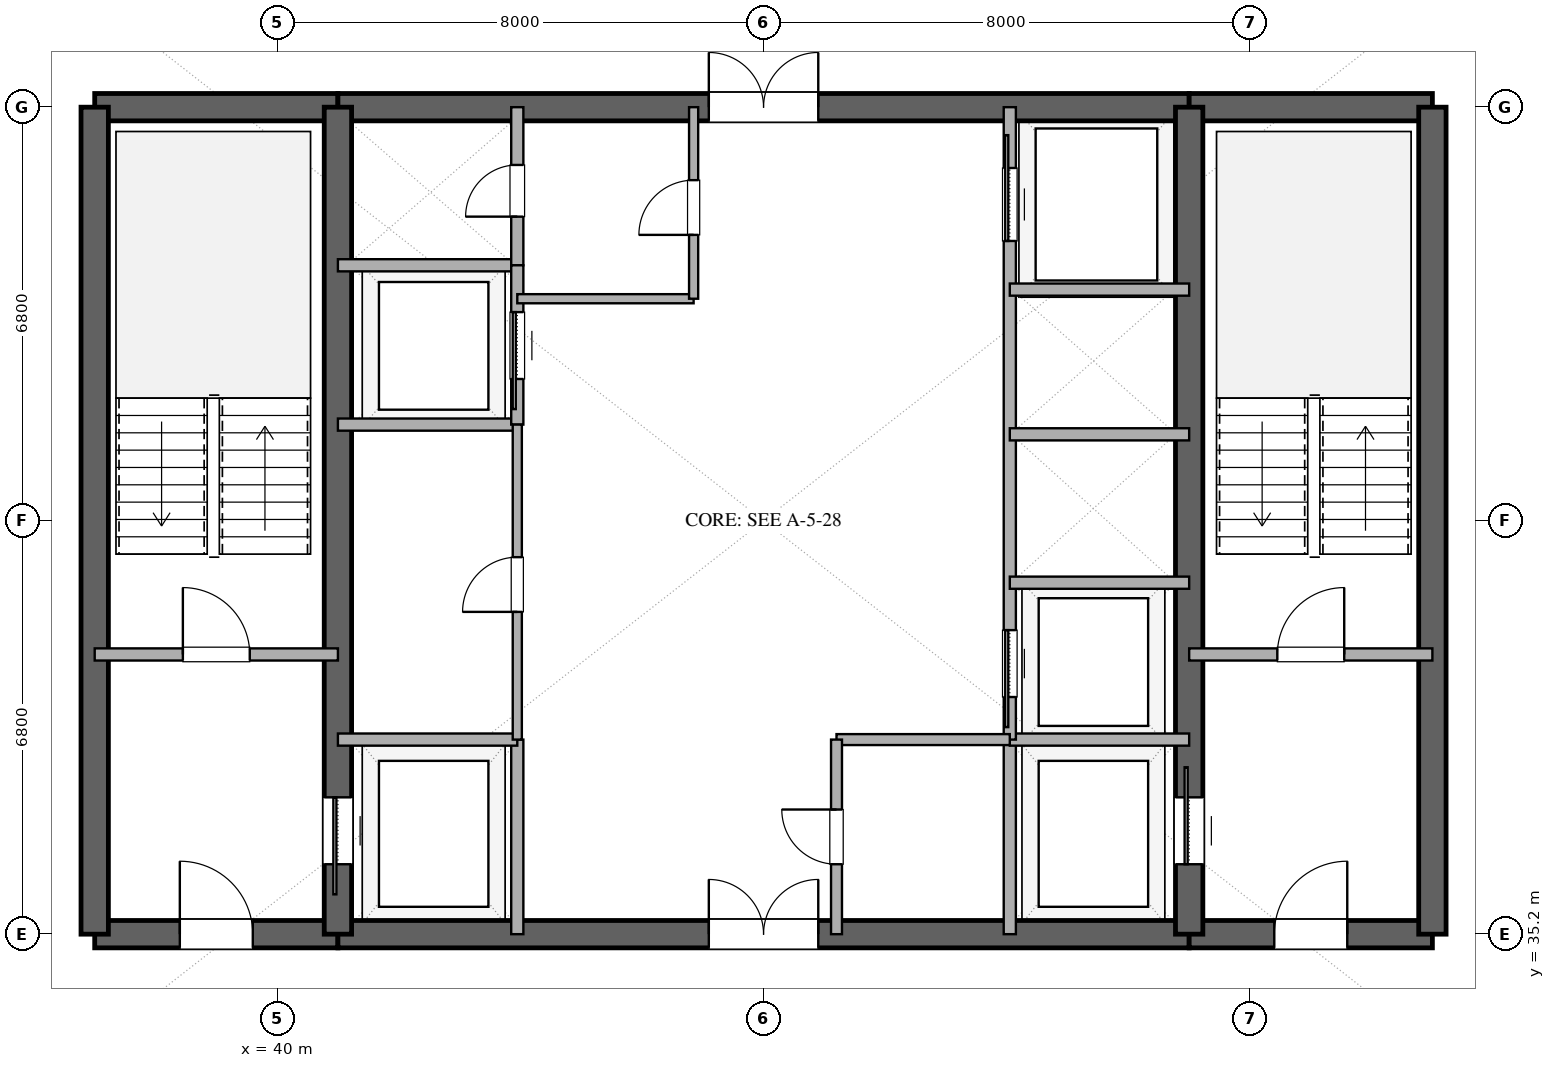
"""IFC4 building model, lengths in metres.
Left out: names, types, materials, properties, quantities, classifications, styles, units other than length and angle.
Written with IfcOpenShell. Run it as: python <this file> out.ifc"""

import sys

from ifc_helpers import new_model, si_unit, direction, frame, frame_2d, origin, place, context, subcontext, project, spatial, rectangle, extrude, element, fill, save


model = new_model("IFC4")
c1 = context("Model", 3, precision=1e-05, world=origin(), true_north=direction((0.0, 1.0)))
c2 = subcontext(c1, "Body", "Model", "MODEL_VIEW")
j1 = project(units=[si_unit("LENGTHUNIT", "METRE"), si_unit("PLANEANGLEUNIT", "RADIAN")], contexts=[c1])
p1 = place(None, origin())
s1 = spatial("IfcSite", under=j1, at=p1, CompositionType="ELEMENT")
p2 = place(p1, origin())
s2 = spatial("IfcBuilding", under=s1, at=p2, CompositionType="ELEMENT")
p3 = place(p2, frame((0.0, 0.0, 183.0)))
s3 = spatial("IfcBuildingStorey", under=s2, at=p3, CompositionType="ELEMENT", Elevation=183.0)
p4 = place(p3, frame((37.0, 35.2, 0.0), z_axis=(0.0, 0.0, 1.0), x_axis=(1.0, 0.0, 0.0)))
e1 = element("IfcWall", 1, at=p4, inside=s3, PredefinedType="SHEAR", context=c2, shape_type="SweptSolid", body=[
    extrude(rectangle(XDim=4.0, YDim=0.45, at=frame_2d((2.0, 0.0))), origin(), (0.0, 0.0, 1.0), 3.38),
])
p5 = place(p4, frame((1.4, 0.0, 0.0)))
e2 = element("IfcOpeningElement", 2, at=p5, cuts=e1, PredefinedType="OPENING", context=c2, shape_type="SweptSolid", body=[
    extrude(rectangle(XDim=1.2, YDim=2.15, at=frame_2d((0.6, 1.075))), frame((0.0, 0.235, 0.0), z_axis=(0.0, -1.0, 0.0), x_axis=(1.0, 0.0, 0.0)), (0.0, 0.0, 1.0), 0.47),
])
p6 = place(p3, frame((41.0, 35.2, 0.0), z_axis=(0.0, 0.0, 1.0), x_axis=(1.0, 0.0, 0.0)))
e3 = element("IfcWall", 3, at=p6, inside=s3, PredefinedType="SHEAR", context=c2, shape_type="SweptSolid", body=[
    extrude(rectangle(XDim=14.0, YDim=0.45, at=frame_2d((7.0, 0.0))), origin(), (0.0, 0.0, 1.0), 3.38),
])
p7 = place(p6, frame((6.1, 0.0, 0.0)))
e4 = element("IfcOpeningElement", 4, at=p7, cuts=e3, PredefinedType="OPENING", context=c2, shape_type="SweptSolid", body=[
    extrude(rectangle(XDim=1.8, YDim=2.25, at=frame_2d((0.9, 1.125))), frame((0.0, 0.235, 0.0), z_axis=(0.0, -1.0, 0.0), x_axis=(1.0, 0.0, 0.0)), (0.0, 0.0, 1.0), 0.47),
])
p8 = place(p3, frame((55.0, 35.2, 0.0), z_axis=(0.0, 0.0, 1.0), x_axis=(1.0, 0.0, 0.0)))
e5 = element("IfcWall", 5, at=p8, inside=s3, PredefinedType="SHEAR", context=c2, shape_type="SweptSolid", body=[
    extrude(rectangle(XDim=4.0, YDim=0.45, at=frame_2d((2.0, 0.0))), origin(), (0.0, 0.0, 1.0), 3.38),
])
p9 = place(p8, frame((1.4, 0.0, 0.0)))
e6 = element("IfcOpeningElement", 6, at=p9, cuts=e5, PredefinedType="OPENING", context=c2, shape_type="SweptSolid", body=[
    extrude(rectangle(XDim=1.2, YDim=2.15, at=frame_2d((0.6, 1.075))), frame((0.0, 0.235, 0.0), z_axis=(0.0, -1.0, 0.0), x_axis=(1.0, 0.0, 0.0)), (0.0, 0.0, 1.0), 0.47),
])
p10 = place(p3, frame((37.0, 48.8, 0.0), z_axis=(0.0, 0.0, 1.0), x_axis=(1.0, 0.0, 0.0)))
e7 = element("IfcWall", 7, at=p10, inside=s3, PredefinedType="SHEAR", context=c2, shape_type="SweptSolid", body=[
    extrude(rectangle(XDim=4.0, YDim=0.45, at=frame_2d((2.0, 0.0))), origin(), (0.0, 0.0, 1.0), 3.38),
])
p11 = place(p3, frame((41.0, 48.8, 0.0), z_axis=(0.0, 0.0, 1.0), x_axis=(1.0, 0.0, 0.0)))
e8 = element("IfcWall", 8, at=p11, inside=s3, PredefinedType="SHEAR", context=c2, shape_type="SweptSolid", body=[
    extrude(rectangle(XDim=14.0, YDim=0.45, at=frame_2d((7.0, 0.0))), origin(), (0.0, 0.0, 1.0), 3.38),
])
p12 = place(p11, frame((6.1, 0.0, 0.0)))
e9 = element("IfcOpeningElement", 9, at=p12, cuts=e8, PredefinedType="OPENING", context=c2, shape_type="SweptSolid", body=[
    extrude(rectangle(XDim=1.8, YDim=2.25, at=frame_2d((0.9, 1.125))), frame((0.0, 0.235, 0.0), z_axis=(0.0, -1.0, 0.0), x_axis=(1.0, 0.0, 0.0)), (0.0, 0.0, 1.0), 0.47),
])
p13 = place(p3, frame((55.0, 48.8, 0.0), z_axis=(0.0, 0.0, 1.0), x_axis=(1.0, 0.0, 0.0)))
e10 = element("IfcWall", 10, at=p13, inside=s3, PredefinedType="SHEAR", context=c2, shape_type="SweptSolid", body=[
    extrude(rectangle(XDim=4.0, YDim=0.45, at=frame_2d((2.0, 0.0))), origin(), (0.0, 0.0, 1.0), 3.38),
])
for number, where, z_axis, x_axis in (
    (11, (37.0, 35.2, 0.0), (0.0, 0.0, 1.0), (0.0, 1.0, 0.0)),
    (12, (59.0, 35.2, 0.0), (0.0, 0.0, 1.0), (0.0, 1.0, 0.0)),
):
    element("IfcWall", number, at=place(p3, frame(where, z_axis=z_axis, x_axis=x_axis)), inside=s3, PredefinedType="SHEAR", context=c2, shape_type="SweptSolid", body=[
        extrude(rectangle(XDim=13.6, YDim=0.45, at=frame_2d((6.8, 0.0))), origin(), (0.0, 0.0, 1.0), 3.38),
    ])
p14 = place(p3, frame((41.0, 35.2, 0.0), z_axis=(0.0, 0.0, 1.0), x_axis=(0.0, 1.0, 0.0)))
e13 = element("IfcWall", 13, at=p14, inside=s3, PredefinedType="SHEAR", context=c2, shape_type="SweptSolid", body=[
    extrude(rectangle(XDim=13.6, YDim=0.45, at=frame_2d((6.8, 0.0))), origin(), (0.0, 0.0, 1.0), 3.38),
])
p15 = place(p14, frame((1.15, 0.0, 0.0)))
e14 = element("IfcOpeningElement", 14, at=p15, cuts=e13, PredefinedType="OPENING", context=c2, shape_type="SweptSolid", body=[
    extrude(rectangle(XDim=1.1, YDim=2.2, at=frame_2d((0.55, 1.1))), frame((0.0, 0.235, 0.0), z_axis=(0.0, -1.0, 0.0), x_axis=(1.0, 0.0, 0.0)), (0.0, 0.0, 1.0), 0.47),
])
p16 = place(p3, frame((55.0, 35.2, 0.0), z_axis=(0.0, 0.0, 1.0), x_axis=(0.0, 1.0, 0.0)))
e15 = element("IfcWall", 15, at=p16, inside=s3, PredefinedType="SHEAR", context=c2, shape_type="SweptSolid", body=[
    extrude(rectangle(XDim=13.6, YDim=0.45, at=frame_2d((6.8, 0.0))), origin(), (0.0, 0.0, 1.0), 3.38),
])
p17 = place(p16, frame((1.15, 0.0, 0.0)))
e16 = element("IfcOpeningElement", 16, at=p17, cuts=e15, PredefinedType="OPENING", context=c2, shape_type="SweptSolid", body=[
    extrude(rectangle(XDim=1.1, YDim=2.2, at=frame_2d((0.55, 1.1))), frame((0.0, 0.235, 0.0), z_axis=(0.0, -1.0, 0.0), x_axis=(1.0, 0.0, 0.0)), (0.0, 0.0, 1.0), 0.47),
])
p18 = place(p3, frame((37.0, 39.8, 0.0), z_axis=(0.0, 0.0, 1.0), x_axis=(1.0, 0.0, 0.0)))
e17 = element("IfcWall", 17, at=p18, inside=s3, PredefinedType="SOLIDWALL", context=c2, shape_type="SweptSolid", body=[
    extrude(rectangle(XDim=4.0, YDim=0.2, at=frame_2d((2.0, 0.0))), origin(), (0.0, 0.0, 1.0), 2.74),
])
p19 = place(p18, frame((1.45, 0.0, 0.0)))
e18 = element("IfcOpeningElement", 18, at=p19, cuts=e17, PredefinedType="OPENING", context=c2, shape_type="SweptSolid", body=[
    extrude(rectangle(XDim=1.1, YDim=2.15, at=frame_2d((0.55, 1.075))), frame((0.0, 0.11, 0.0), z_axis=(0.0, -1.0, 0.0), x_axis=(1.0, 0.0, 0.0)), (0.0, 0.0, 1.0), 0.22),
])
p20 = place(p3, frame((55.0, 39.8, 0.0), z_axis=(0.0, 0.0, 1.0), x_axis=(1.0, 0.0, 0.0)))
e19 = element("IfcWall", 19, at=p20, inside=s3, PredefinedType="SOLIDWALL", context=c2, shape_type="SweptSolid", body=[
    extrude(rectangle(XDim=4.0, YDim=0.2, at=frame_2d((2.0, 0.0))), origin(), (0.0, 0.0, 1.0), 2.74),
])
p21 = place(p20, frame((1.45, 0.0, 0.0)))
e20 = element("IfcOpeningElement", 20, at=p21, cuts=e19, PredefinedType="OPENING", context=c2, shape_type="SweptSolid", body=[
    extrude(rectangle(XDim=1.1, YDim=2.15, at=frame_2d((0.55, 1.075))), frame((0.0, 0.11, 0.0), z_axis=(0.0, -1.0, 0.0), x_axis=(1.0, 0.0, 0.0)), (0.0, 0.0, 1.0), 0.22),
])
p22 = place(p3, frame((43.95, 35.2, 0.0), z_axis=(0.0, 0.0, 1.0), x_axis=(0.0, 1.0, 0.0)))
e21 = element("IfcWall", 21, at=p22, inside=s3, PredefinedType="SOLIDWALL", context=c2, shape_type="SweptSolid", body=[
    extrude(rectangle(XDim=3.2, YDim=0.2, at=frame_2d((1.6, 0.0))), origin(), (0.0, 0.0, 1.0), 2.74),
])
p23 = place(p3, frame((41.0, 38.4, 0.0), z_axis=(0.0, 0.0, 1.0), x_axis=(1.0, 0.0, 0.0)))
e22 = element("IfcWall", 22, at=p23, inside=s3, PredefinedType="SOLIDWALL", context=c2, shape_type="SweptSolid", body=[
    extrude(rectangle(XDim=2.95, YDim=0.2, at=frame_2d((1.475, 0.0))), origin(), (0.0, 0.0, 1.0), 2.74),
])
p24 = place(p3, frame((52.05, 35.2, 0.0), z_axis=(0.0, 0.0, 1.0), x_axis=(0.0, 1.0, 0.0)))
e23 = element("IfcWall", 23, at=p24, inside=s3, PredefinedType="SOLIDWALL", context=c2, shape_type="SweptSolid", body=[
    extrude(rectangle(XDim=3.2, YDim=0.2, at=frame_2d((1.6, 0.0))), origin(), (0.0, 0.0, 1.0), 2.74),
])
for number, where, z_axis, x_axis in (
    (24, (52.05, 38.4, 0.0), (0.0, 0.0, 1.0), (1.0, 0.0, 0.0)),
    (25, (41.0, 46.2, 0.0), (0.0, 0.0, 1.0), (1.0, 0.0, 0.0)),
):
    element("IfcWall", number, at=place(p3, frame(where, z_axis=z_axis, x_axis=x_axis)), inside=s3, PredefinedType="SOLIDWALL", context=c2, shape_type="SweptSolid", body=[
        extrude(rectangle(XDim=2.95, YDim=0.2, at=frame_2d((1.475, 0.0))), origin(), (0.0, 0.0, 1.0), 2.74),
    ])
p25 = place(p3, frame((43.95, 46.2, 0.0), z_axis=(0.0, 0.0, 1.0), x_axis=(0.0, 1.0, 0.0)))
e26 = element("IfcWall", 26, at=p25, inside=s3, PredefinedType="SOLIDWALL", context=c2, shape_type="SweptSolid", body=[
    extrude(rectangle(XDim=2.6, YDim=0.2, at=frame_2d((1.3, 0.0))), origin(), (0.0, 0.0, 1.0), 2.74),
])
p26 = place(p25, frame((0.8, 0.0, 0.0)))
e27 = element("IfcOpeningElement", 27, at=p26, cuts=e26, PredefinedType="OPENING", context=c2, shape_type="SweptSolid", body=[
    extrude(rectangle(XDim=0.85, YDim=2.15, at=frame_2d((0.425, 1.075))), frame((0.0, 0.11, 0.0), z_axis=(0.0, -1.0, 0.0), x_axis=(1.0, 0.0, 0.0)), (0.0, 0.0, 1.0), 0.22),
])
p27 = place(p3, frame((41.0, 43.58, 0.0), z_axis=(0.0, 0.0, 1.0), x_axis=(1.0, 0.0, 0.0)))
e28 = element("IfcWall", 28, at=p27, inside=s3, PredefinedType="SOLIDWALL", context=c2, shape_type="SweptSolid", body=[
    extrude(rectangle(XDim=2.95, YDim=0.2, at=frame_2d((1.475, 0.0))), origin(), (0.0, 0.0, 1.0), 2.74),
])
p28 = place(p3, frame((43.95, 43.58, 0.0), z_axis=(0.0, 0.0, 1.0), x_axis=(0.0, 1.0, 0.0)))
e29 = element("IfcWall", 29, at=p28, inside=s3, PredefinedType="SOLIDWALL", context=c2, shape_type="SweptSolid", body=[
    extrude(rectangle(XDim=2.62, YDim=0.2, at=frame_2d((1.31, 0.0))), origin(), (0.0, 0.0, 1.0), 2.74),
])
p29 = place(p28, frame((0.75, 0.0, 0.0)))
e30 = element("IfcOpeningElement", 30, at=p29, cuts=e29, PredefinedType="OPENING", context=c2, shape_type="SweptSolid", body=[
    extrude(rectangle(XDim=1.1, YDim=2.2, at=frame_2d((0.55, 1.1))), frame((0.0, 0.11, 0.0), z_axis=(0.0, -1.0, 0.0), x_axis=(1.0, 0.0, 0.0)), (0.0, 0.0, 1.0), 0.22),
])
p30 = place(p3, frame((43.95, 38.4, 0.0), z_axis=(0.0, 0.0, 1.0), x_axis=(0.0, 1.0, 0.0)))
e31 = element("IfcWall", 31, at=p30, inside=s3, PredefinedType="PARTITIONING", context=c2, shape_type="SweptSolid", body=[
    extrude(rectangle(XDim=5.18, YDim=0.15, at=frame_2d((2.59, 0.0))), origin(), (0.0, 0.0, 1.0), 2.74),
])
p31 = place(p30, frame((2.1, 0.0, 0.0)))
e32 = element("IfcOpeningElement", 32, at=p31, cuts=e31, PredefinedType="OPENING", context=c2, shape_type="SweptSolid", body=[
    extrude(rectangle(XDim=0.9, YDim=2.15, at=frame_2d((0.45, 1.075))), frame((0.0, 0.085, 0.0), z_axis=(0.0, -1.0, 0.0), x_axis=(1.0, 0.0, 0.0)), (0.0, 0.0, 1.0), 0.17),
])
p32 = place(p3, frame((52.05, 38.4, 0.0), z_axis=(0.0, 0.0, 1.0), x_axis=(0.0, 1.0, 0.0)))
e33 = element("IfcWall", 33, at=p32, inside=s3, PredefinedType="SOLIDWALL", context=c2, shape_type="SweptSolid", body=[
    extrude(rectangle(XDim=10.4, YDim=0.2, at=frame_2d((5.2, 0.0))), origin(), (0.0, 0.0, 1.0), 2.74),
])
p33 = place(p32, frame((0.7, 0.0, 0.0)))
e34 = element("IfcOpeningElement", 34, at=p33, cuts=e33, PredefinedType="OPENING", context=c2, shape_type="SweptSolid", body=[
    extrude(rectangle(XDim=1.1, YDim=2.2, at=frame_2d((0.55, 1.1))), frame((0.0, 0.11, 0.0), z_axis=(0.0, -1.0, 0.0), x_axis=(1.0, 0.0, 0.0)), (0.0, 0.0, 1.0), 0.22),
])
p34 = place(p32, frame((8.2, 0.0, 0.0)))
e35 = element("IfcOpeningElement", 35, at=p34, cuts=e33, PredefinedType="OPENING", context=c2, shape_type="SweptSolid", body=[
    extrude(rectangle(XDim=1.2, YDim=2.2, at=frame_2d((0.6, 1.1))), frame((0.0, 0.11, 0.0), z_axis=(0.0, -1.0, 0.0), x_axis=(1.0, 0.0, 0.0)), (0.0, 0.0, 1.0), 0.22),
])
for number, where, z_axis, x_axis in (
    (36, (52.05, 40.98, 0.0), (0.0, 0.0, 1.0), (1.0, 0.0, 0.0)),
    (37, (52.05, 43.42, 0.0), (0.0, 0.0, 1.0), (1.0, 0.0, 0.0)),
    (38, (52.05, 45.8, 0.0), (0.0, 0.0, 1.0), (1.0, 0.0, 0.0)),
):
    element("IfcWall", number, at=place(p3, frame(where, z_axis=z_axis, x_axis=x_axis)), inside=s3, PredefinedType="SOLIDWALL", context=c2, shape_type="SweptSolid", body=[
        extrude(rectangle(XDim=2.95, YDim=0.2, at=frame_2d((1.475, 0.0))), origin(), (0.0, 0.0, 1.0), 2.74),
    ])
p35 = place(p3, frame((43.95, 45.65, 0.0), z_axis=(0.0, 0.0, 1.0), x_axis=(1.0, 0.0, 0.0)))
e39 = element("IfcWall", 39, at=p35, inside=s3, PredefinedType="PARTITIONING", context=c2, shape_type="SweptSolid", body=[
    extrude(rectangle(XDim=2.9, YDim=0.15, at=frame_2d((1.45, 0.0))), origin(), (0.0, 0.0, 1.0), 2.74),
])
p36 = place(p3, frame((46.85, 45.65, 0.0), z_axis=(0.0, 0.0, 1.0), x_axis=(0.0, 1.0, 0.0)))
e40 = element("IfcWall", 40, at=p36, inside=s3, PredefinedType="PARTITIONING", context=c2, shape_type="SweptSolid", body=[
    extrude(rectangle(XDim=3.15, YDim=0.15, at=frame_2d((1.575, 0.0))), origin(), (0.0, 0.0, 1.0), 2.74),
])
p37 = place(p36, frame((1.05, 0.0, 0.0)))
e41 = element("IfcOpeningElement", 41, at=p37, cuts=e40, PredefinedType="OPENING", context=c2, shape_type="SweptSolid", body=[
    extrude(rectangle(XDim=0.9, YDim=2.15, at=frame_2d((0.45, 1.075))), frame((0.0, 0.085, 0.0), z_axis=(0.0, -1.0, 0.0), x_axis=(1.0, 0.0, 0.0)), (0.0, 0.0, 1.0), 0.17),
])
p38 = place(p3, frame((49.2, 38.4, 0.0), z_axis=(0.0, 0.0, 1.0), x_axis=(1.0, 0.0, 0.0)))
e42 = element("IfcWall", 42, at=p38, inside=s3, PredefinedType="PLUMBINGWALL", context=c2, shape_type="SweptSolid", body=[
    extrude(rectangle(XDim=2.85, YDim=0.18, at=frame_2d((1.425, 0.0))), origin(), (0.0, 0.0, 1.0), 2.74),
])
p39 = place(p3, frame((49.2, 35.2, 0.0), z_axis=(0.0, 0.0, 1.0), x_axis=(0.0, 1.0, 0.0)))
e43 = element("IfcWall", 43, at=p39, inside=s3, PredefinedType="PLUMBINGWALL", context=c2, shape_type="SweptSolid", body=[
    extrude(rectangle(XDim=3.2, YDim=0.18, at=frame_2d((1.6, 0.0))), origin(), (0.0, 0.0, 1.0), 2.74),
])
p40 = place(p39, frame((1.15, 0.0, 0.0)))
e44 = element("IfcOpeningElement", 44, at=p40, cuts=e43, PredefinedType="OPENING", context=c2, shape_type="SweptSolid", body=[
    extrude(rectangle(XDim=0.9, YDim=2.1, at=frame_2d((0.45, 1.05))), frame((0.0, 0.1, 0.0), z_axis=(0.0, -1.0, 0.0), x_axis=(1.0, 0.0, 0.0)), (0.0, 0.0, 1.0), 0.2),
])
p41 = place(p15, origin())
e45 = element("IfcDoor", 45, at=p41, inside=s3, OperationType="SLIDING_TO_LEFT", PredefinedType="DOOR", context=c2, shape_type="SweptSolid", body=[
    extrude(rectangle(XDim=1.1, YDim=2.2, at=frame_2d((0.55, 1.1))), frame((0.0, 0.025, 0.0), z_axis=(0.0, -1.0, 0.0), x_axis=(1.0, 0.0, 0.0)), (0.0, 0.0, 1.0), 0.05),
])
fill(e14, e45)
p42 = place(p17, origin())
e46 = element("IfcDoor", 46, at=p42, inside=s3, OperationType="SLIDING_TO_RIGHT", PredefinedType="DOOR", context=c2, shape_type="SweptSolid", body=[
    extrude(rectangle(XDim=1.1, YDim=2.2, at=frame_2d((0.55, 1.1))), frame((0.0, 0.025, 0.0), z_axis=(0.0, -1.0, 0.0), x_axis=(1.0, 0.0, 0.0)), (0.0, 0.0, 1.0), 0.05),
])
fill(e16, e46)
p43 = place(p5, origin())
e47 = element("IfcDoor", 47, at=p43, inside=s3, OperationType="SINGLE_SWING_LEFT", PredefinedType="DOOR", context=c2, shape_type="SweptSolid", body=[
    extrude(rectangle(XDim=1.2, YDim=2.15, at=frame_2d((0.6, 1.075))), frame((0.0, 0.025, 0.0), z_axis=(0.0, -1.0, 0.0), x_axis=(1.0, 0.0, 0.0)), (0.0, 0.0, 1.0), 0.05),
])
fill(e2, e47)
p44 = place(p9, origin())
e48 = element("IfcDoor", 48, at=p44, inside=s3, OperationType="SINGLE_SWING_RIGHT", PredefinedType="DOOR", context=c2, shape_type="SweptSolid", body=[
    extrude(rectangle(XDim=1.2, YDim=2.15, at=frame_2d((0.6, 1.075))), frame((0.0, 0.025, 0.0), z_axis=(0.0, -1.0, 0.0), x_axis=(1.0, 0.0, 0.0)), (0.0, 0.0, 1.0), 0.05),
])
fill(e6, e48)
p45 = place(p7, origin())
e49 = element("IfcDoor", 49, at=p45, inside=s3, OperationType="DOUBLE_DOOR_SINGLE_SWING", PredefinedType="DOOR", context=c2, shape_type="SweptSolid", body=[
    extrude(rectangle(XDim=1.8, YDim=2.25, at=frame_2d((0.9, 1.125))), frame((0.0, 0.025, 0.0), z_axis=(0.0, -1.0, 0.0), x_axis=(1.0, 0.0, 0.0)), (0.0, 0.0, 1.0), 0.05),
])
fill(e4, e49)
p46 = place(p12, origin())
e50 = element("IfcDoor", 50, at=p46, inside=s3, OperationType="DOUBLE_DOOR_SINGLE_SWING", PredefinedType="DOOR", context=c2, shape_type="SweptSolid", body=[
    extrude(rectangle(XDim=1.8, YDim=2.25, at=frame_2d((0.9, 1.125))), frame((0.0, 0.025, 0.0), z_axis=(0.0, -1.0, 0.0), x_axis=(1.0, 0.0, 0.0)), (0.0, 0.0, 1.0), 0.05),
])
fill(e9, e50)
p47 = place(p19, origin())
e51 = element("IfcDoor", 51, at=p47, inside=s3, OperationType="SINGLE_SWING_LEFT", PredefinedType="DOOR", context=c2, shape_type="SweptSolid", body=[
    extrude(rectangle(XDim=1.1, YDim=2.15, at=frame_2d((0.55, 1.075))), frame((0.0, 0.025, 0.0), z_axis=(0.0, -1.0, 0.0), x_axis=(1.0, 0.0, 0.0)), (0.0, 0.0, 1.0), 0.05),
])
fill(e18, e51)
p48 = place(p21, origin())
e52 = element("IfcDoor", 52, at=p48, inside=s3, OperationType="SINGLE_SWING_RIGHT", PredefinedType="DOOR", context=c2, shape_type="SweptSolid", body=[
    extrude(rectangle(XDim=1.1, YDim=2.15, at=frame_2d((0.55, 1.075))), frame((0.0, 0.025, 0.0), z_axis=(0.0, -1.0, 0.0), x_axis=(1.0, 0.0, 0.0)), (0.0, 0.0, 1.0), 0.05),
])
fill(e20, e52)
p49 = place(p26, origin())
e53 = element("IfcDoor", 53, at=p49, inside=s3, OperationType="SINGLE_SWING_LEFT", PredefinedType="DOOR", context=c2, shape_type="SweptSolid", body=[
    extrude(rectangle(XDim=0.85, YDim=2.15, at=frame_2d((0.425, 1.075))), frame((0.0, 0.025, 0.0), z_axis=(0.0, -1.0, 0.0), x_axis=(1.0, 0.0, 0.0)), (0.0, 0.0, 1.0), 0.05),
])
fill(e27, e53)
p50 = place(p29, origin())
e54 = element("IfcDoor", 54, at=p50, inside=s3, OperationType="SLIDING_TO_LEFT", PredefinedType="DOOR", context=c2, shape_type="SweptSolid", body=[
    extrude(rectangle(XDim=1.1, YDim=2.2, at=frame_2d((0.55, 1.1))), frame((0.0, 0.025, 0.0), z_axis=(0.0, -1.0, 0.0), x_axis=(1.0, 0.0, 0.0)), (0.0, 0.0, 1.0), 0.05),
])
fill(e30, e54)
p51 = place(p31, origin())
e55 = element("IfcDoor", 55, at=p51, inside=s3, OperationType="SINGLE_SWING_LEFT", PredefinedType="DOOR", context=c2, shape_type="SweptSolid", body=[
    extrude(rectangle(XDim=0.9, YDim=2.15, at=frame_2d((0.45, 1.075))), frame((0.0, 0.025, 0.0), z_axis=(0.0, -1.0, 0.0), x_axis=(1.0, 0.0, 0.0)), (0.0, 0.0, 1.0), 0.05),
])
fill(e32, e55)
p52 = place(p33, origin())
e56 = element("IfcDoor", 56, at=p52, inside=s3, OperationType="SLIDING_TO_LEFT", PredefinedType="DOOR", context=c2, shape_type="SweptSolid", body=[
    extrude(rectangle(XDim=1.1, YDim=2.2, at=frame_2d((0.55, 1.1))), frame((0.0, 0.025, 0.0), z_axis=(0.0, -1.0, 0.0), x_axis=(1.0, 0.0, 0.0)), (0.0, 0.0, 1.0), 0.05),
])
fill(e34, e56)
p53 = place(p34, origin())
e57 = element("IfcDoor", 57, at=p53, inside=s3, OperationType="SLIDING_TO_RIGHT", PredefinedType="DOOR", context=c2, shape_type="SweptSolid", body=[
    extrude(rectangle(XDim=1.2, YDim=2.2, at=frame_2d((0.6, 1.1))), frame((0.0, 0.025, 0.0), z_axis=(0.0, -1.0, 0.0), x_axis=(1.0, 0.0, 0.0)), (0.0, 0.0, 1.0), 0.05),
])
fill(e35, e57)
p54 = place(p37, origin())
e58 = element("IfcDoor", 58, at=p54, inside=s3, OperationType="SINGLE_SWING_LEFT", PredefinedType="DOOR", context=c2, shape_type="SweptSolid", body=[
    extrude(rectangle(XDim=0.9, YDim=2.15, at=frame_2d((0.45, 1.075))), frame((0.0, 0.025, 0.0), z_axis=(0.0, -1.0, 0.0), x_axis=(1.0, 0.0, 0.0)), (0.0, 0.0, 1.0), 0.05),
])
fill(e41, e58)
p55 = place(p40, origin())
e59 = element("IfcDoor", 59, at=p55, inside=s3, OperationType="SINGLE_SWING_RIGHT", PredefinedType="DOOR", context=c2, shape_type="SweptSolid", body=[
    extrude(rectangle(XDim=0.9, YDim=2.1, at=frame_2d((0.45, 1.05))), frame((0.0, 0.025, 0.0), z_axis=(0.0, -1.0, 0.0), x_axis=(1.0, 0.0, 0.0)), (0.0, 0.0, 1.0), 0.05),
])
fill(e44, e59)
save(model, sys.argv[1])
